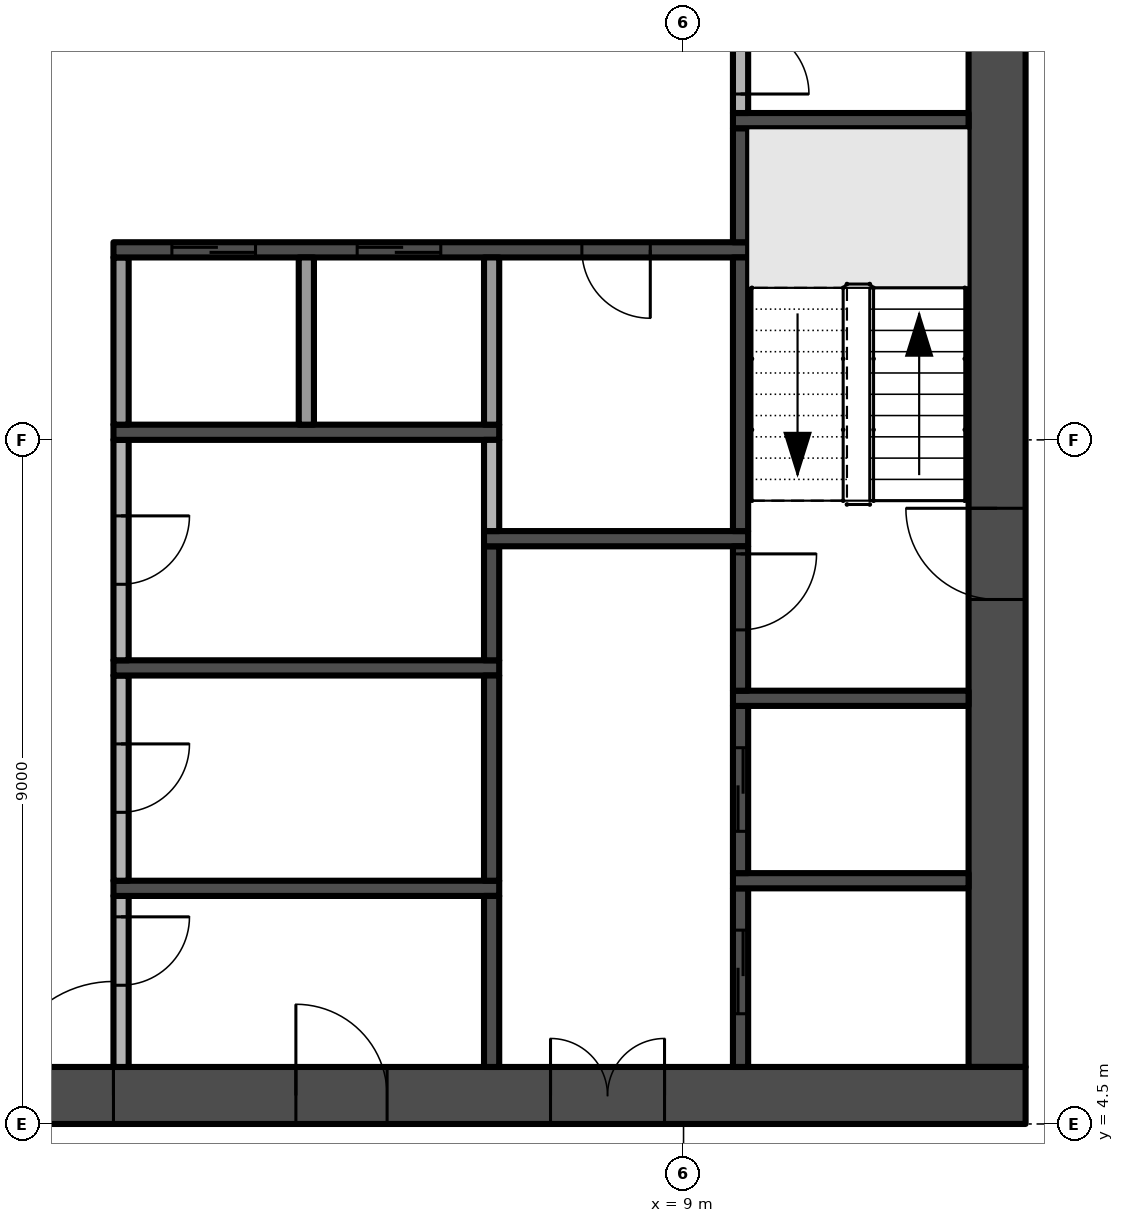
"""IFC4 building model, lengths in metres.
Left out: names, types, materials, properties, quantities, classifications, styles, units other than length and angle.
Written with IfcOpenShell. Run it as: python <this file> out.ifc"""

import sys

from ifc_helpers import new_model, si_unit, direction, frame, frame_2d, origin, place, context, subcontext, project, spatial, rectangle, extrude, element, fill, save


model = new_model("IFC4")
c1 = context("Model", 3, precision=1e-05, world=origin(), true_north=direction((0.0, 1.0)))
c2 = subcontext(c1, "Body", "Model", "MODEL_VIEW")
j1 = project(units=[si_unit("LENGTHUNIT", "METRE"), si_unit("PLANEANGLEUNIT", "RADIAN")], contexts=[c1])
p1 = place(None, origin())
s1 = spatial("IfcSite", under=j1, at=p1, CompositionType="ELEMENT")
p2 = place(p1, origin())
s2 = spatial("IfcBuilding", under=s1, at=p2, CompositionType="ELEMENT")
p3 = place(p2, frame((0.0, 0.0, 166.8)))
s3 = spatial("IfcBuildingStorey", under=s2, at=p3, CompositionType="ELEMENT", Elevation=166.8)
p4 = place(p3, frame((-13.5, 4.875, -0.3), z_axis=(0.0, 0.0, 1.0), x_axis=(1.0, 0.0, 0.0)))
e1 = element("IfcWall", 1, at=p4, inside=s3, PredefinedType="SHEAR", context=c2, shape_type="SweptSolid", body=[
    extrude(rectangle(XDim=27.0, YDim=0.75, at=frame_2d((13.5, 0.0))), origin(), (0.0, 0.0, 1.0), 3.8),
])
p5 = place(p4, frame((12.0, 0.0, 0.3)))
e2 = element("IfcOpeningElement", 2, at=p5, cuts=e1, PredefinedType="OPENING", context=c2, shape_type="SweptSolid", body=[
    extrude(rectangle(XDim=3.0, YDim=2.4, at=frame_2d((1.5, 1.2))), frame((0.0, 0.385, 0.0), z_axis=(0.0, -1.0, 0.0), x_axis=(1.0, 0.0, 0.0)), (0.0, 0.0, 1.0), 0.77),
])
p6 = place(p4, frame((4.9, 0.0, 0.3)))
e3 = element("IfcOpeningElement", 3, at=p6, cuts=e1, PredefinedType="OPENING", context=c2, shape_type="SweptSolid", body=[
    extrude(rectangle(XDim=1.2, YDim=2.2, at=frame_2d((0.6, 1.1))), frame((0.0, 0.385, 0.0), z_axis=(0.0, -1.0, 0.0), x_axis=(1.0, 0.0, 0.0)), (0.0, 0.0, 1.0), 0.77),
])
p7 = place(p4, frame((20.75, 0.0, 0.3)))
e4 = element("IfcOpeningElement", 4, at=p7, cuts=e1, PredefinedType="OPENING", context=c2, shape_type="SweptSolid", body=[
    extrude(rectangle(XDim=1.5, YDim=2.2, at=frame_2d((0.75, 1.1))), frame((0.0, 0.385, 0.0), z_axis=(0.0, -1.0, 0.0), x_axis=(1.0, 0.0, 0.0)), (0.0, 0.0, 1.0), 0.77),
])
p8 = place(p4, frame((17.4, 0.0, 0.3)))
e5 = element("IfcOpeningElement", 5, at=p8, cuts=e1, PredefinedType="OPENING", context=c2, shape_type="SweptSolid", body=[
    extrude(rectangle(XDim=1.2, YDim=2.2, at=frame_2d((0.6, 1.1))), frame((0.0, 0.385, 0.0), z_axis=(0.0, -1.0, 0.0), x_axis=(1.0, 0.0, 0.0)), (0.0, 0.0, 1.0), 0.77),
])
p9 = place(p3, frame((13.125, 5.25, -0.3), z_axis=(0.0, 0.0, 1.0), x_axis=(0.0, 1.0, 0.0)))
e6 = element("IfcWall", 6, at=p9, inside=s3, PredefinedType="SHEAR", context=c2, shape_type="SweptSolid", body=[
    extrude(rectangle(XDim=16.5, YDim=0.75, at=frame_2d((8.25, 0.0))), origin(), (0.0, 0.0, 1.0), 3.8),
])
p10 = place(p9, frame((6.15, 0.0, 0.3)))
e7 = element("IfcOpeningElement", 7, at=p10, cuts=e6, PredefinedType="OPENING", context=c2, shape_type="SweptSolid", body=[
    extrude(rectangle(XDim=1.2, YDim=2.2, at=frame_2d((0.6, 1.1))), frame((0.0, 0.385, 0.0), z_axis=(0.0, -1.0, 0.0), x_axis=(1.0, 0.0, 0.0)), (0.0, 0.0, 1.0), 0.77),
])
p11 = place(p3, frame((1.6, 7.5, 0.0), z_axis=(0.0, 0.0, 1.0), x_axis=(0.0, -1.0, 0.0)))
e8 = element("IfcWall", 8, at=p11, inside=s3, PredefinedType="PARTITIONING", context=c2, shape_type="SweptSolid", body=[
    extrude(rectangle(XDim=2.25, YDim=0.2, at=frame_2d((1.125, 0.0))), origin(), (0.0, 0.0, 1.0), 3.5),
])
p12 = place(p11, frame((0.275, 0.0, 0.0)))
e9 = element("IfcOpeningElement", 9, at=p12, cuts=e8, PredefinedType="OPENING", context=c2, shape_type="SweptSolid", body=[
    extrude(rectangle(XDim=0.9, YDim=2.1, at=frame_2d((0.45, 1.05))), frame((0.0, 0.11, 0.0), z_axis=(0.0, -1.0, 0.0), x_axis=(1.0, 0.0, 0.0)), (0.0, 0.0, 1.0), 0.22),
])
p13 = place(p3, frame((1.5, 7.6, 0.0), z_axis=(0.0, 0.0, 1.0), x_axis=(1.0, 0.0, 0.0)))
e10 = element("IfcWall", 10, at=p13, inside=s3, PredefinedType="SHEAR", context=c2, shape_type="SweptSolid", body=[
    extrude(rectangle(XDim=5.075, YDim=0.2, at=frame_2d((2.538, 0.0))), origin(), (0.0, 0.0, 1.0), 3.5),
])
p14 = place(p3, frame((1.6, 10.4, 0.0), z_axis=(0.0, 0.0, 1.0), x_axis=(0.0, -1.0, 0.0)))
e11 = element("IfcWall", 11, at=p14, inside=s3, PredefinedType="PARTITIONING", context=c2, shape_type="SweptSolid", body=[
    extrude(rectangle(XDim=2.7, YDim=0.2, at=frame_2d((1.35, 0.0))), origin(), (0.0, 0.0, 1.0), 3.5),
])
p15 = place(p14, frame((0.9, 0.0, 0.0)))
e12 = element("IfcOpeningElement", 12, at=p15, cuts=e11, PredefinedType="OPENING", context=c2, shape_type="SweptSolid", body=[
    extrude(rectangle(XDim=0.9, YDim=2.1, at=frame_2d((0.45, 1.05))), frame((0.0, 0.11, 0.0), z_axis=(0.0, -1.0, 0.0), x_axis=(1.0, 0.0, 0.0)), (0.0, 0.0, 1.0), 0.22),
])
p16 = place(p3, frame((1.5, 10.5, 0.0), z_axis=(0.0, 0.0, 1.0), x_axis=(1.0, 0.0, 0.0)))
e13 = element("IfcWall", 13, at=p16, inside=s3, PredefinedType="SHEAR", context=c2, shape_type="SweptSolid", body=[
    extrude(rectangle(XDim=5.075, YDim=0.2, at=frame_2d((2.538, 0.0))), origin(), (0.0, 0.0, 1.0), 3.5),
])
p17 = place(p3, frame((1.6, 13.5, 0.0), z_axis=(0.0, 0.0, 1.0), x_axis=(0.0, -1.0, 0.0)))
e14 = element("IfcWall", 14, at=p17, inside=s3, PredefinedType="PARTITIONING", context=c2, shape_type="SweptSolid", body=[
    extrude(rectangle(XDim=2.9, YDim=0.2, at=frame_2d((1.45, 0.0))), origin(), (0.0, 0.0, 1.0), 3.5),
])
p18 = place(p17, frame((1.0, 0.0, 0.0)))
e15 = element("IfcOpeningElement", 15, at=p18, cuts=e14, PredefinedType="OPENING", context=c2, shape_type="SweptSolid", body=[
    extrude(rectangle(XDim=0.9, YDim=2.1, at=frame_2d((0.45, 1.05))), frame((0.0, 0.11, 0.0), z_axis=(0.0, -1.0, 0.0), x_axis=(1.0, 0.0, 0.0)), (0.0, 0.0, 1.0), 0.22),
])
p19 = place(p3, frame((1.5, 13.6, 0.0), z_axis=(0.0, 0.0, 1.0), x_axis=(1.0, 0.0, 0.0)))
e16 = element("IfcWall", 16, at=p19, inside=s3, PredefinedType="SHEAR", context=c2, shape_type="SweptSolid", body=[
    extrude(rectangle(XDim=5.075, YDim=0.2, at=frame_2d((2.538, 0.0))), origin(), (0.0, 0.0, 1.0), 3.5),
])
p20 = place(p3, frame((1.6, 13.7, 0.0), z_axis=(0.0, 0.0, 1.0), x_axis=(0.0, 1.0, 0.0)))
e17 = element("IfcWall", 17, at=p20, inside=s3, PredefinedType="PARTITIONING", context=c2, shape_type="SweptSolid", body=[
    extrude(rectangle(XDim=2.2, YDim=0.2, at=frame_2d((1.1, 0.0))), origin(), (0.0, 0.0, 1.0), 3.5),
])
p21 = place(p3, frame((9.85, 16.0, 0.0), z_axis=(0.0, 0.0, 1.0), x_axis=(-1.0, 0.0, 0.0)))
e18 = element("IfcWall", 18, at=p21, inside=s3, PredefinedType="SHEAR", context=c2, shape_type="SweptSolid", body=[
    extrude(rectangle(XDim=8.35, YDim=0.2, at=frame_2d((4.175, 0.0))), origin(), (0.0, 0.0, 1.0), 3.5),
])
p22 = place(p21, frame((6.481, 0.0, 0.0)))
e19 = element("IfcOpeningElement", 19, at=p22, cuts=e18, PredefinedType="OPENING", context=c2, shape_type="SweptSolid", body=[
    extrude(rectangle(XDim=1.1, YDim=2.1, at=frame_2d((0.55, 1.05))), frame((0.0, 0.11, 0.0), z_axis=(0.0, -1.0, 0.0), x_axis=(1.0, 0.0, 0.0)), (0.0, 0.0, 1.0), 0.22),
])
p23 = place(p21, frame((4.044, 0.0, 0.0)))
e20 = element("IfcOpeningElement", 20, at=p23, cuts=e18, PredefinedType="OPENING", context=c2, shape_type="SweptSolid", body=[
    extrude(rectangle(XDim=1.1, YDim=2.1, at=frame_2d((0.55, 1.05))), frame((0.0, 0.11, 0.0), z_axis=(0.0, -1.0, 0.0), x_axis=(1.0, 0.0, 0.0)), (0.0, 0.0, 1.0), 0.22),
])
p24 = place(p21, frame((1.288, 0.0, 0.0)))
e21 = element("IfcOpeningElement", 21, at=p24, cuts=e18, PredefinedType="OPENING", context=c2, shape_type="SweptSolid", body=[
    extrude(rectangle(XDim=0.9, YDim=2.1, at=frame_2d((0.45, 1.05))), frame((0.0, 0.11, 0.0), z_axis=(0.0, -1.0, 0.0), x_axis=(1.0, 0.0, 0.0)), (0.0, 0.0, 1.0), 0.22),
])
p25 = place(p3, frame((4.037, 13.7, 0.0), z_axis=(0.0, 0.0, 1.0), x_axis=(0.0, 1.0, 0.0)))
e22 = element("IfcWall", 22, at=p25, inside=s3, PredefinedType="PARTITIONING", context=c2, shape_type="SweptSolid", body=[
    extrude(rectangle(XDim=2.2, YDim=0.2, at=frame_2d((1.1, 0.0))), origin(), (0.0, 0.0, 1.0), 3.5),
])
p26 = place(p3, frame((6.475, 5.25, 0.0), z_axis=(0.0, 0.0, 1.0), x_axis=(0.0, 1.0, 0.0)))
e23 = element("IfcWall", 23, at=p26, inside=s3, PredefinedType="SHEAR", context=c2, shape_type="SweptSolid", body=[
    extrude(rectangle(XDim=2.25, YDim=0.2, at=frame_2d((1.125, 0.0))), origin(), (0.0, 0.0, 1.0), 3.5),
])
p27 = place(p3, frame((6.475, 7.7, 0.0), z_axis=(0.0, 0.0, 1.0), x_axis=(0.0, 1.0, 0.0)))
e24 = element("IfcWall", 24, at=p27, inside=s3, PredefinedType="SHEAR", context=c2, shape_type="SweptSolid", body=[
    extrude(rectangle(XDim=2.7, YDim=0.2, at=frame_2d((1.35, 0.0))), origin(), (0.0, 0.0, 1.0), 3.5),
])
p28 = place(p3, frame((6.475, 10.6, 0.0), z_axis=(0.0, 0.0, 1.0), x_axis=(0.0, 1.0, 0.0)))
e25 = element("IfcWall", 25, at=p28, inside=s3, PredefinedType="SHEAR", context=c2, shape_type="SweptSolid", body=[
    extrude(rectangle(XDim=1.5, YDim=0.2, at=frame_2d((0.75, 0.0))), origin(), (0.0, 0.0, 1.0), 3.5),
])
p29 = place(p3, frame((6.375, 12.2, 0.0), z_axis=(0.0, 0.0, 1.0), x_axis=(1.0, 0.0, 0.0)))
e26 = element("IfcWall", 26, at=p29, inside=s3, PredefinedType="SHEAR", context=c2, shape_type="SweptSolid", body=[
    extrude(rectangle(XDim=3.475, YDim=0.2, at=frame_2d((1.738, 0.0))), origin(), (0.0, 0.0, 1.0), 3.5),
])
p30 = place(p3, frame((6.475, 12.3, 0.0), z_axis=(0.0, 0.0, 1.0), x_axis=(0.0, 1.0, 0.0)))
e27 = element("IfcWall", 27, at=p30, inside=s3, PredefinedType="PARTITIONING", context=c2, shape_type="SweptSolid", body=[
    extrude(rectangle(XDim=1.2, YDim=0.2, at=frame_2d((0.6, 0.0))), origin(), (0.0, 0.0, 1.0), 3.5),
])
p31 = place(p3, frame((6.475, 13.7, 0.0), z_axis=(0.0, 0.0, 1.0), x_axis=(0.0, 1.0, 0.0)))
e28 = element("IfcWall", 28, at=p31, inside=s3, PredefinedType="PARTITIONING", context=c2, shape_type="SweptSolid", body=[
    extrude(rectangle(XDim=2.2, YDim=0.2, at=frame_2d((1.1, 0.0))), origin(), (0.0, 0.0, 1.0), 3.5),
])
p32 = place(p3, frame((9.75, 5.25, 0.0), z_axis=(0.0, 0.0, 1.0), x_axis=(0.0, 1.0, 0.0)))
e29 = element("IfcWall", 29, at=p32, inside=s3, PredefinedType="SHEAR", context=c2, shape_type="SweptSolid", body=[
    extrude(rectangle(XDim=2.35, YDim=0.2, at=frame_2d((1.175, 0.0))), origin(), (0.0, 0.0, 1.0), 3.5),
])
p33 = place(p32, frame((0.7, 0.0, 0.0)))
e30 = element("IfcOpeningElement", 30, at=p33, cuts=e29, PredefinedType="OPENING", context=c2, shape_type="SweptSolid", body=[
    extrude(rectangle(XDim=1.1, YDim=2.1, at=frame_2d((0.55, 1.05))), frame((0.0, 0.11, 0.0), z_axis=(0.0, -1.0, 0.0), x_axis=(1.0, 0.0, 0.0)), (0.0, 0.0, 1.0), 0.22),
])
p34 = place(p3, frame((9.65, 7.7, 0.0), z_axis=(0.0, 0.0, 1.0), x_axis=(1.0, 0.0, 0.0)))
e31 = element("IfcWall", 31, at=p34, inside=s3, PredefinedType="SHEAR", context=c2, shape_type="SweptSolid", body=[
    extrude(rectangle(XDim=3.1, YDim=0.2, at=frame_2d((1.55, 0.0))), origin(), (0.0, 0.0, 1.0), 3.5),
])
p35 = place(p3, frame((9.75, 7.8, 0.0), z_axis=(0.0, 0.0, 1.0), x_axis=(0.0, 1.0, 0.0)))
e32 = element("IfcWall", 32, at=p35, inside=s3, PredefinedType="SHEAR", context=c2, shape_type="SweptSolid", body=[
    extrude(rectangle(XDim=2.2, YDim=0.2, at=frame_2d((1.1, 0.0))), origin(), (0.0, 0.0, 1.0), 3.5),
])
p36 = place(p35, frame((0.55, 0.0, 0.0)))
e33 = element("IfcOpeningElement", 33, at=p36, cuts=e32, PredefinedType="OPENING", context=c2, shape_type="SweptSolid", body=[
    extrude(rectangle(XDim=1.1, YDim=2.1, at=frame_2d((0.55, 1.05))), frame((0.0, 0.11, 0.0), z_axis=(0.0, -1.0, 0.0), x_axis=(1.0, 0.0, 0.0)), (0.0, 0.0, 1.0), 0.22),
])
p37 = place(p3, frame((9.65, 10.1, 0.0), z_axis=(0.0, 0.0, 1.0), x_axis=(1.0, 0.0, 0.0)))
e34 = element("IfcWall", 34, at=p37, inside=s3, PredefinedType="SHEAR", context=c2, shape_type="SweptSolid", body=[
    extrude(rectangle(XDim=3.1, YDim=0.2, at=frame_2d((1.55, 0.0))), origin(), (0.0, 0.0, 1.0), 3.5),
])
p38 = place(p3, frame((9.75, 12.1, 0.0), z_axis=(0.0, 0.0, 1.0), x_axis=(0.0, -1.0, 0.0)))
e35 = element("IfcWall", 35, at=p38, inside=s3, PredefinedType="SHEAR", context=c2, shape_type="SweptSolid", body=[
    extrude(rectangle(XDim=1.9, YDim=0.2, at=frame_2d((0.95, 0.0))), origin(), (0.0, 0.0, 1.0), 3.5),
])
p39 = place(p38, frame((0.1, 0.0, 0.0)))
e36 = element("IfcOpeningElement", 36, at=p39, cuts=e35, PredefinedType="OPENING", context=c2, shape_type="SweptSolid", body=[
    extrude(rectangle(XDim=1.0, YDim=2.2, at=frame_2d((0.5, 1.1))), frame((0.0, 0.11, 0.0), z_axis=(0.0, -1.0, 0.0), x_axis=(1.0, 0.0, 0.0)), (0.0, 0.0, 1.0), 0.22),
])
p40 = place(p3, frame((9.75, 12.3, 0.0), z_axis=(0.0, 0.0, 1.0), x_axis=(0.0, 1.0, 0.0)))
e37 = element("IfcWall", 37, at=p40, inside=s3, PredefinedType="SHEAR", context=c2, shape_type="SweptSolid", body=[
    extrude(rectangle(XDim=3.6, YDim=0.2, at=frame_2d((1.8, 0.0))), origin(), (0.0, 0.0, 1.0), 3.5),
])
p41 = place(p3, frame((9.75, 16.1, 0.0), z_axis=(0.0, 0.0, 1.0), x_axis=(0.0, 1.0, 0.0)))
e38 = element("IfcWall", 38, at=p41, inside=s3, PredefinedType="SHEAR", context=c2, shape_type="SweptSolid", body=[
    extrude(rectangle(XDim=1.5, YDim=0.2, at=frame_2d((0.75, 0.0))), origin(), (0.0, 0.0, 1.0), 3.5),
])
p42 = place(p3, frame((9.65, 17.7, 0.0), z_axis=(0.0, 0.0, 1.0), x_axis=(1.0, 0.0, 0.0)))
e39 = element("IfcWall", 39, at=p42, inside=s3, PredefinedType="SHEAR", context=c2, shape_type="SweptSolid", body=[
    extrude(rectangle(XDim=3.1, YDim=0.2, at=frame_2d((1.55, 0.0))), origin(), (0.0, 0.0, 1.0), 3.5),
])
p43 = place(p3, frame((9.75, 19.2, 0.0), z_axis=(0.0, 0.0, 1.0), x_axis=(0.0, -1.0, 0.0)))
e40 = element("IfcWall", 40, at=p43, inside=s3, PredefinedType="PARTITIONING", context=c2, shape_type="SweptSolid", body=[
    extrude(rectangle(XDim=1.4, YDim=0.2, at=frame_2d((0.7, 0.0))), origin(), (0.0, 0.0, 1.0), 3.5),
])
p44 = place(p43, frame((0.25, 0.0, 0.0)))
e41 = element("IfcOpeningElement", 41, at=p44, cuts=e40, PredefinedType="OPENING", context=c2, shape_type="SweptSolid", body=[
    extrude(rectangle(XDim=0.9, YDim=2.1, at=frame_2d((0.45, 1.05))), frame((0.0, 0.11, 0.0), z_axis=(0.0, -1.0, 0.0), x_axis=(1.0, 0.0, 0.0)), (0.0, 0.0, 1.0), 0.22),
])
p45 = place(p5, frame((3.0, 0.0, 0.0), z_axis=(0.0, 0.0, 1.0), x_axis=(-1.0, 0.0, 0.0)))
e42 = element("IfcDoor", 42, at=p45, inside=s3, OperationType="DOUBLE_DOOR_SINGLE_SWING", PredefinedType="DOOR", context=c2, shape_type="SweptSolid", body=[
    extrude(rectangle(XDim=3.0, YDim=2.4, at=frame_2d((1.5, 1.2))), frame((0.0, 0.025, 0.0), z_axis=(0.0, -1.0, 0.0), x_axis=(1.0, 0.0, 0.0)), (0.0, 0.0, 1.0), 0.05),
])
fill(e2, e42)
p46 = place(p10, frame((1.2, 0.0, 0.0), z_axis=(0.0, 0.0, 1.0), x_axis=(-1.0, 0.0, 0.0)))
e43 = element("IfcDoor", 43, at=p46, inside=s3, OperationType="SINGLE_SWING_LEFT", PredefinedType="DOOR", context=c2, shape_type="SweptSolid", body=[
    extrude(rectangle(XDim=1.2, YDim=2.2, at=frame_2d((0.6, 1.1))), frame((0.0, 0.025, 0.0), z_axis=(0.0, -1.0, 0.0), x_axis=(1.0, 0.0, 0.0)), (0.0, 0.0, 1.0), 0.05),
])
fill(e7, e43)
p47 = place(p7, frame((1.5, 0.0, 0.0), z_axis=(0.0, 0.0, 1.0), x_axis=(-1.0, 0.0, 0.0)))
e44 = element("IfcDoor", 44, at=p47, inside=s3, OperationType="DOUBLE_DOOR_SINGLE_SWING", PredefinedType="DOOR", context=c2, shape_type="SweptSolid", body=[
    extrude(rectangle(XDim=1.5, YDim=2.2, at=frame_2d((0.75, 1.1))), frame((0.0, 0.025, 0.0), z_axis=(0.0, -1.0, 0.0), x_axis=(1.0, 0.0, 0.0)), (0.0, 0.0, 1.0), 0.05),
])
fill(e4, e44)
p48 = place(p8, frame((1.2, 0.0, 0.0), z_axis=(0.0, 0.0, 1.0), x_axis=(-1.0, 0.0, 0.0)))
e45 = element("IfcDoor", 45, at=p48, inside=s3, OperationType="SINGLE_SWING_RIGHT", PredefinedType="DOOR", context=c2, shape_type="SweptSolid", body=[
    extrude(rectangle(XDim=1.2, YDim=2.2, at=frame_2d((0.6, 1.1))), frame((0.0, 0.025, 0.0), z_axis=(0.0, -1.0, 0.0), x_axis=(1.0, 0.0, 0.0)), (0.0, 0.0, 1.0), 0.05),
])
fill(e5, e45)
p49 = place(p39, origin())
e46 = element("IfcDoor", 46, at=p49, inside=s3, OperationType="SINGLE_SWING_LEFT", PredefinedType="DOOR", context=c2, shape_type="SweptSolid", body=[
    extrude(rectangle(XDim=1.0, YDim=2.2, at=frame_2d((0.5, 1.1))), frame((0.0, 0.025, 0.0), z_axis=(0.0, -1.0, 0.0), x_axis=(1.0, 0.0, 0.0)), (0.0, 0.0, 1.0), 0.05),
])
fill(e36, e46)
p50 = place(p22, origin())
e47 = element("IfcDoor", 47, at=p50, inside=s3, OperationType="SLIDING_TO_RIGHT", PredefinedType="DOOR", context=c2, shape_type="SweptSolid", body=[
    extrude(rectangle(XDim=1.1, YDim=2.1, at=frame_2d((0.55, 1.05))), frame((0.0, 0.025, 0.0), z_axis=(0.0, -1.0, 0.0), x_axis=(1.0, 0.0, 0.0)), (0.0, 0.0, 1.0), 0.05),
])
fill(e19, e47)
p51 = place(p23, origin())
e48 = element("IfcDoor", 48, at=p51, inside=s3, OperationType="SLIDING_TO_RIGHT", PredefinedType="DOOR", context=c2, shape_type="SweptSolid", body=[
    extrude(rectangle(XDim=1.1, YDim=2.1, at=frame_2d((0.55, 1.05))), frame((0.0, 0.025, 0.0), z_axis=(0.0, -1.0, 0.0), x_axis=(1.0, 0.0, 0.0)), (0.0, 0.0, 1.0), 0.05),
])
fill(e20, e48)
p52 = place(p33, origin())
e49 = element("IfcDoor", 49, at=p52, inside=s3, OperationType="SLIDING_TO_RIGHT", PredefinedType="DOOR", context=c2, shape_type="SweptSolid", body=[
    extrude(rectangle(XDim=1.1, YDim=2.1, at=frame_2d((0.55, 1.05))), frame((0.0, 0.025, 0.0), z_axis=(0.0, -1.0, 0.0), x_axis=(1.0, 0.0, 0.0)), (0.0, 0.0, 1.0), 0.05),
])
fill(e30, e49)
p53 = place(p36, origin())
e50 = element("IfcDoor", 50, at=p53, inside=s3, OperationType="SLIDING_TO_RIGHT", PredefinedType="DOOR", context=c2, shape_type="SweptSolid", body=[
    extrude(rectangle(XDim=1.1, YDim=2.1, at=frame_2d((0.55, 1.05))), frame((0.0, 0.025, 0.0), z_axis=(0.0, -1.0, 0.0), x_axis=(1.0, 0.0, 0.0)), (0.0, 0.0, 1.0), 0.05),
])
fill(e33, e50)
p54 = place(p12, origin())
e51 = element("IfcDoor", 51, at=p54, inside=s3, OperationType="SINGLE_SWING_LEFT", PredefinedType="DOOR", context=c2, shape_type="SweptSolid", body=[
    extrude(rectangle(XDim=0.9, YDim=2.1, at=frame_2d((0.45, 1.05))), frame((0.0, 0.025, 0.0), z_axis=(0.0, -1.0, 0.0), x_axis=(1.0, 0.0, 0.0)), (0.0, 0.0, 1.0), 0.05),
])
fill(e9, e51)
p55 = place(p15, origin())
e52 = element("IfcDoor", 52, at=p55, inside=s3, OperationType="SINGLE_SWING_LEFT", PredefinedType="DOOR", context=c2, shape_type="SweptSolid", body=[
    extrude(rectangle(XDim=0.9, YDim=2.1, at=frame_2d((0.45, 1.05))), frame((0.0, 0.025, 0.0), z_axis=(0.0, -1.0, 0.0), x_axis=(1.0, 0.0, 0.0)), (0.0, 0.0, 1.0), 0.05),
])
fill(e12, e52)
p56 = place(p18, origin())
e53 = element("IfcDoor", 53, at=p56, inside=s3, OperationType="SINGLE_SWING_LEFT", PredefinedType="DOOR", context=c2, shape_type="SweptSolid", body=[
    extrude(rectangle(XDim=0.9, YDim=2.1, at=frame_2d((0.45, 1.05))), frame((0.0, 0.025, 0.0), z_axis=(0.0, -1.0, 0.0), x_axis=(1.0, 0.0, 0.0)), (0.0, 0.0, 1.0), 0.05),
])
fill(e15, e53)
p57 = place(p24, origin())
e54 = element("IfcDoor", 54, at=p57, inside=s3, OperationType="SINGLE_SWING_LEFT", PredefinedType="DOOR", context=c2, shape_type="SweptSolid", body=[
    extrude(rectangle(XDim=0.9, YDim=2.1, at=frame_2d((0.45, 1.05))), frame((0.0, 0.025, 0.0), z_axis=(0.0, -1.0, 0.0), x_axis=(1.0, 0.0, 0.0)), (0.0, 0.0, 1.0), 0.05),
])
fill(e21, e54)
p58 = place(p44, origin())
e55 = element("IfcDoor", 55, at=p58, inside=s3, OperationType="SINGLE_SWING_RIGHT", PredefinedType="DOOR", context=c2, shape_type="SweptSolid", body=[
    extrude(rectangle(XDim=0.9, YDim=2.1, at=frame_2d((0.45, 1.05))), frame((0.0, 0.025, 0.0), z_axis=(0.0, -1.0, 0.0), x_axis=(1.0, 0.0, 0.0)), (0.0, 0.0, 1.0), 0.05),
])
fill(e41, e55)
save(model, sys.argv[1])
